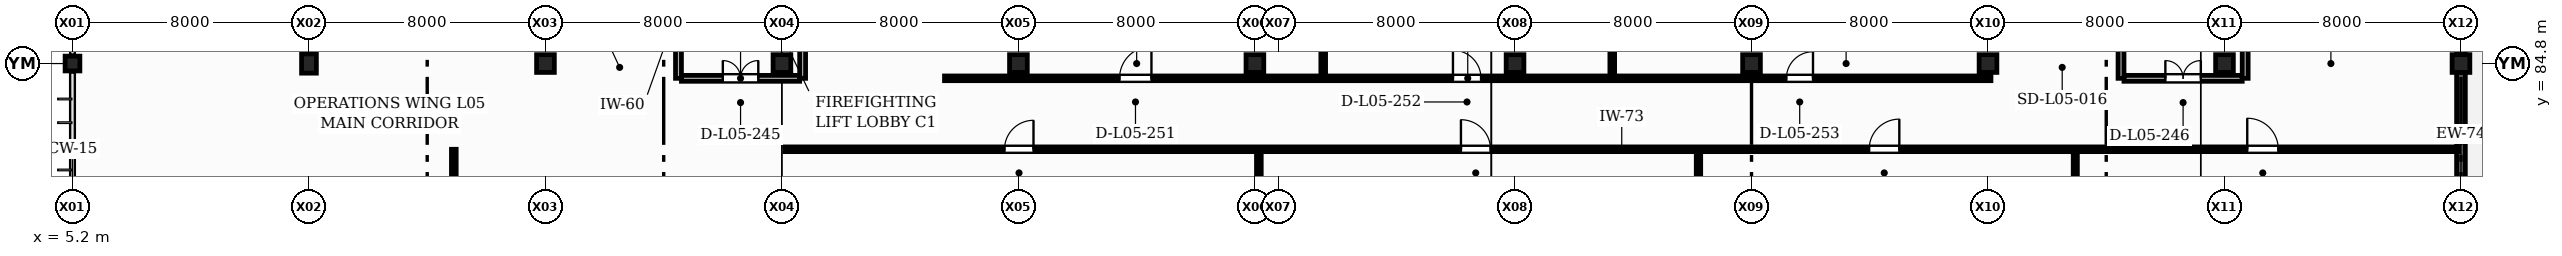
"""IFC4 building model, lengths in metres.
Left out: names, types, materials, properties, quantities, classifications, styles, units other than length and angle.
Written with IfcOpenShell. Run it as: python <this file> out.ifc"""

import sys

from ifc_helpers import new_model, si_unit, direction, frame, frame_2d, origin, origin_2d, place, context, subcontext, project, spatial, rectangle, extrude, element, fill, save


model = new_model("IFC4")
c1 = context("Model", 3, precision=1e-05, world=origin(), true_north=direction((0.0, 1.0)))
c2 = subcontext(c1, "Body", "Model", "MODEL_VIEW")
j1 = project(units=[si_unit("LENGTHUNIT", "METRE"), si_unit("PLANEANGLEUNIT", "RADIAN")], contexts=[c1])
p1 = place(None, origin())
s1 = spatial("IfcSite", under=j1, at=p1, CompositionType="ELEMENT")
p2 = place(p1, origin())
s2 = spatial("IfcBuilding", under=s1, at=p2, CompositionType="ELEMENT")
p3 = place(p2, frame((0.0, 0.0, 21.9)))
s3 = spatial("IfcBuildingStorey", under=s2, at=p3, CompositionType="ELEMENT", Elevation=21.9)
p4 = place(p3, frame((5.2, 84.8, 0.0), z_axis=(0.0, 0.0, 1.0), x_axis=(1.0, 0.0, 0.0)))
e1 = element("IfcColumn", 1, at=p4, inside=s3, PredefinedType="COLUMN", context=c2, shape_type="SweptSolid", body=[
    extrude(rectangle(XDim=0.5, YDim=0.5, at=origin_2d()), origin(), (0.0, 0.0, 1.0), 3.9),
])
p5 = place(p3, frame((13.2, 84.8, 0.0), z_axis=(0.0, 0.0, 1.0), x_axis=(1.0, 0.0, 0.0)))
e2 = element("IfcColumn", 2, at=p5, inside=s3, PredefinedType="COLUMN", context=c2, shape_type="SweptSolid", body=[
    extrude(rectangle(XDim=0.5, YDim=0.65, at=origin_2d()), origin(), (0.0, 0.0, 1.0), 3.9),
])
for number, where, z_axis, x_axis in (
    (3, (21.2, 84.8, 0.0), (0.0, 0.0, 1.0), (1.0, 0.0, 0.0)),
    (4, (29.2, 84.8, 0.0), (0.0, 0.0, 1.0), (1.0, 0.0, 0.0)),
    (5, (37.2, 84.8, 0.0), (0.0, 0.0, 1.0), (1.0, 0.0, 0.0)),
    (6, (45.2, 84.8, 0.0), (0.0, 0.0, 1.0), (1.0, 0.0, 0.0)),
    (7, (54.0, 84.8, 0.0), (0.0, 0.0, 1.0), (1.0, 0.0, 0.0)),
    (8, (62.0, 84.8, 0.0), (0.0, 0.0, 1.0), (1.0, 0.0, 0.0)),
    (9, (70.0, 84.8, 0.0), (0.0, 0.0, 1.0), (1.0, 0.0, 0.0)),
    (10, (78.0, 84.8, 0.0), (0.0, 0.0, 1.0), (1.0, 0.0, 0.0)),
    (11, (86.0, 84.8, 0.0), (0.0, 0.0, 1.0), (1.0, 0.0, 0.0)),
):
    element("IfcColumn", number, at=place(p3, frame(where, z_axis=z_axis, x_axis=x_axis)), inside=s3, PredefinedType="COLUMN", context=c2, shape_type="SweptSolid", body=[
        extrude(rectangle(XDim=0.6, YDim=0.6, at=origin_2d()), origin(), (0.0, 0.0, 1.0), 3.9),
    ])
p6 = place(p3, frame((86.0, 77.1, 0.0), z_axis=(0.0, 0.0, 1.0), x_axis=(0.0, 1.0, 0.0)))
e12 = element("IfcWall", 12, at=p6, inside=s3, PredefinedType="SOLIDWALL", context=c2, shape_type="SweptSolid", body=[
    extrude(rectangle(XDim=7.4, YDim=0.295, at=frame_2d((3.7, 0.0))), origin(), (0.0, 0.0, 1.0), 3.0),
])
p7 = place(p6, frame((2.525, 0.0, 0.0)))
e13 = element("IfcOpeningElement", 13, at=p7, cuts=e12, PredefinedType="OPENING", context=c2, shape_type="SweptSolid", body=[
    extrude(rectangle(XDim=1.15, YDim=2.15, at=frame_2d((0.575, 1.075))), frame((0.0, 0.157, 0.0), z_axis=(0.0, -1.0, 0.0), x_axis=(1.0, 0.0, 0.0)), (0.0, 0.0, 1.0), 0.315),
])
p8 = place(p3, frame((86.0, 85.1, 0.0), z_axis=(0.0, 0.0, 1.0), x_axis=(0.0, 1.0, 0.0)))
e14 = element("IfcWall", 14, at=p8, inside=s3, PredefinedType="SOLIDWALL", context=c2, shape_type="SweptSolid", body=[
    extrude(rectangle(XDim=7.4, YDim=0.295, at=frame_2d((3.7, 0.0))), origin(), (0.0, 0.0, 1.0), 3.0),
])
p9 = place(p8, frame((2.3, 0.0, 0.9)))
e15 = element("IfcOpeningElement", 15, at=p9, cuts=e14, PredefinedType="OPENING", context=c2, shape_type="SweptSolid", body=[
    extrude(rectangle(XDim=2.8, YDim=1.8, at=frame_2d((1.4, 0.9))), frame((0.0, 0.157, 0.0), z_axis=(0.0, -1.0, 0.0), x_axis=(1.0, 0.0, 0.0)), (0.0, 0.0, 1.0), 0.315),
])
p10 = place(p3, frame((25.8, 84.3, 0.0), z_axis=(0.0, 0.0, 1.0), x_axis=(1.0, 0.0, 0.0)))
e16 = element("IfcWall", 16, at=p10, inside=s3, PredefinedType="PARTITIONING", context=c2, shape_type="SweptSolid", body=[
    extrude(rectangle(XDim=4.0, YDim=0.2, at=frame_2d((2.0, 0.0))), origin(), (0.0, 0.0, 1.0), 2.785),
])
p11 = place(p10, frame((1.4, 0.0, 0.0)))
e17 = element("IfcOpeningElement", 17, at=p11, cuts=e16, PredefinedType="OPENING", context=c2, shape_type="SweptSolid", body=[
    extrude(rectangle(XDim=1.2, YDim=2.15, at=frame_2d((0.6, 1.075))), frame((0.0, 0.11, 0.0), z_axis=(0.0, -1.0, 0.0), x_axis=(1.0, 0.0, 0.0)), (0.0, 0.0, 1.0), 0.22),
])
p12 = place(p3, frame((25.7, 84.3, 0.0), z_axis=(0.0, 0.0, 1.0), x_axis=(0.0, 1.0, 0.0)))
e18 = element("IfcWall", 18, at=p12, inside=s3, PredefinedType="PARTITIONING", context=c2, shape_type="SweptSolid", body=[
    extrude(rectangle(XDim=4.8, YDim=0.2, at=frame_2d((2.4, 0.0))), origin(), (0.0, 0.0, 1.0), 2.985),
])
p13 = place(p3, frame((29.9, 84.3, 0.0), z_axis=(0.0, 0.0, 1.0), x_axis=(0.0, 1.0, 0.0)))
e19 = element("IfcWall", 19, at=p13, inside=s3, PredefinedType="PARTITIONING", context=c2, shape_type="SweptSolid", body=[
    extrude(rectangle(XDim=4.8, YDim=0.2, at=frame_2d((2.4, 0.0))), origin(), (0.0, 0.0, 1.0), 3.035),
])
p14 = place(p3, frame((74.6, 84.3, 0.0), z_axis=(0.0, 0.0, 1.0), x_axis=(1.0, 0.0, 0.0)))
e20 = element("IfcWall", 20, at=p14, inside=s3, PredefinedType="PARTITIONING", context=c2, shape_type="SweptSolid", body=[
    extrude(rectangle(XDim=4.0, YDim=0.2, at=frame_2d((2.0, 0.0))), origin(), (0.0, 0.0, 1.0), 2.785),
])
p15 = place(p14, frame((1.4, 0.0, 0.0)))
e21 = element("IfcOpeningElement", 21, at=p15, cuts=e20, PredefinedType="OPENING", context=c2, shape_type="SweptSolid", body=[
    extrude(rectangle(XDim=1.2, YDim=2.15, at=frame_2d((0.6, 1.075))), frame((0.0, 0.11, 0.0), z_axis=(0.0, -1.0, 0.0), x_axis=(1.0, 0.0, 0.0)), (0.0, 0.0, 1.0), 0.22),
])
p16 = place(p3, frame((74.5, 84.3, 0.0), z_axis=(0.0, 0.0, 1.0), x_axis=(0.0, 1.0, 0.0)))
e22 = element("IfcWall", 22, at=p16, inside=s3, PredefinedType="PARTITIONING", context=c2, shape_type="SweptSolid", body=[
    extrude(rectangle(XDim=4.8, YDim=0.2, at=frame_2d((2.4, 0.0))), origin(), (0.0, 0.0, 1.0), 2.985),
])
p17 = place(p3, frame((78.7, 84.3, 0.0), z_axis=(0.0, 0.0, 1.0), x_axis=(0.0, 1.0, 0.0)))
e23 = element("IfcWall", 23, at=p17, inside=s3, PredefinedType="PARTITIONING", context=c2, shape_type="SweptSolid", body=[
    extrude(rectangle(XDim=4.8, YDim=0.2, at=frame_2d((2.4, 0.0))), origin(), (0.0, 0.0, 1.0), 3.035),
])
p18 = place(p3, frame((45.334, 76.88, 0.0), z_axis=(0.0, 0.0, 1.0), x_axis=(0.0, 1.0, 0.0)))
e24 = element("IfcWall", 24, at=p18, inside=s3, PredefinedType="PARTITIONING", context=c2, shape_type="SweptSolid", body=[
    extrude(rectangle(XDim=4.92, YDim=0.16, at=frame_2d((2.46, 0.0))), origin(), (0.0, 0.0, 1.0), 2.785),
])
p19 = place(p3, frame((60.206, 76.88, 0.0), z_axis=(0.0, 0.0, 1.0), x_axis=(0.0, 1.0, 0.0)))
e25 = element("IfcWall", 25, at=p19, inside=s3, PredefinedType="PARTITIONING", context=c2, shape_type="SweptSolid", body=[
    extrude(rectangle(XDim=4.92, YDim=0.15, at=frame_2d((2.46, 0.0))), origin(), (0.0, 0.0, 1.0), 2.985),
])
p20 = place(p3, frame((72.953, 76.88, 0.0), z_axis=(0.0, 0.0, 1.0), x_axis=(0.0, 1.0, 0.0)))
e26 = element("IfcWall", 26, at=p20, inside=s3, PredefinedType="PARTITIONING", context=c2, shape_type="SweptSolid", body=[
    extrude(rectangle(XDim=4.92, YDim=0.14, at=frame_2d((2.46, 0.0))), origin(), (0.0, 0.0, 1.0), 2.985),
])
p21 = place(p3, frame((29.3, 81.9, 0.0), z_axis=(0.0, 0.0, 1.0), x_axis=(1.0, 0.0, 0.0)))
e27 = element("IfcWall", 27, at=p21, inside=s3, PredefinedType="PARTITIONING", context=c2, shape_type="SweptSolid", body=[
    extrude(rectangle(XDim=56.62, YDim=0.16, at=frame_2d((28.31, 0.0))), origin(), (0.0, 0.0, 1.0), 2.785),
])
p22 = place(p21, frame((7.43, 0.0, 0.0)))
e28 = element("IfcOpeningElement", 28, at=p22, cuts=e27, PredefinedType="OPENING", context=c2, shape_type="SweptSolid", body=[
    extrude(rectangle(XDim=0.98, YDim=2.12, at=frame_2d((0.49, 1.06))), frame((0.0, 0.09, 0.0), z_axis=(0.0, -1.0, 0.0), x_axis=(1.0, 0.0, 0.0)), (0.0, 0.0, 1.0), 0.18),
])
p23 = place(p21, frame((22.87, 0.0, 0.0)))
e29 = element("IfcOpeningElement", 29, at=p23, cuts=e27, PredefinedType="OPENING", context=c2, shape_type="SweptSolid", body=[
    extrude(rectangle(XDim=1.0, YDim=2.1, at=frame_2d((0.5, 1.05))), frame((0.0, 0.09, 0.0), z_axis=(0.0, -1.0, 0.0), x_axis=(1.0, 0.0, 0.0)), (0.0, 0.0, 1.0), 0.18),
])
p24 = place(p21, frame((36.68, 0.0, 0.0)))
e30 = element("IfcOpeningElement", 30, at=p24, cuts=e27, PredefinedType="OPENING", context=c2, shape_type="SweptSolid", body=[
    extrude(rectangle(XDim=1.02, YDim=2.12, at=frame_2d((0.51, 1.06))), frame((0.0, 0.09, 0.0), z_axis=(0.0, -1.0, 0.0), x_axis=(1.0, 0.0, 0.0)), (0.0, 0.0, 1.0), 0.18),
])
p25 = place(p21, frame((49.47, 0.0, 0.0)))
e31 = element("IfcOpeningElement", 31, at=p25, cuts=e27, PredefinedType="OPENING", context=c2, shape_type="SweptSolid", body=[
    extrude(rectangle(XDim=1.05, YDim=2.1, at=frame_2d((0.525, 1.05))), frame((0.0, 0.09, 0.0), z_axis=(0.0, -1.0, 0.0), x_axis=(1.0, 0.0, 0.0)), (0.0, 0.0, 1.0), 0.18),
])
p26 = place(p3, frame((47.511, 84.5, 0.0), z_axis=(0.0, 0.0, 1.0), x_axis=(0.0, 1.0, 0.0)))
e32 = element("IfcWall", 32, at=p26, inside=s3, PredefinedType="PARTITIONING", context=c2, shape_type="SweptSolid", body=[
    extrude(rectangle(XDim=8.22, YDim=0.16, at=frame_2d((4.11, 0.0))), origin(), (0.0, 0.0, 1.0), 2.785),
])
p27 = place(p3, frame((57.289, 84.5, 0.0), z_axis=(0.0, 0.0, 1.0), x_axis=(0.0, 1.0, 0.0)))
e33 = element("IfcWall", 33, at=p27, inside=s3, PredefinedType="PARTITIONING", context=c2, shape_type="SweptSolid", body=[
    extrude(rectangle(XDim=8.22, YDim=0.16, at=frame_2d((4.11, 0.0))), origin(), (0.0, 0.0, 1.0), 2.885),
])
p28 = place(p3, frame((34.7, 84.3, 0.0), z_axis=(0.0, 0.0, 1.0), x_axis=(1.0, 0.0, 0.0)))
e34 = element("IfcWall", 34, at=p28, inside=s3, PredefinedType="PARTITIONING", context=c2, shape_type="SweptSolid", body=[
    extrude(rectangle(XDim=35.4, YDim=0.16, at=frame_2d((17.7, 0.0))), origin(), (0.0, 0.0, 1.0), 2.785),
])
p29 = place(p28, frame((5.92, 0.0, 0.0)))
e35 = element("IfcOpeningElement", 35, at=p29, cuts=e34, PredefinedType="OPENING", context=c2, shape_type="SweptSolid", body=[
    extrude(rectangle(XDim=1.08, YDim=2.14, at=frame_2d((0.54, 1.07))), frame((0.0, 0.09, 0.0), z_axis=(0.0, -1.0, 0.0), x_axis=(1.0, 0.0, 0.0)), (0.0, 0.0, 1.0), 0.18),
])
p30 = place(p28, frame((17.2, 0.0, 0.0)))
e36 = element("IfcOpeningElement", 36, at=p30, cuts=e34, PredefinedType="OPENING", context=c2, shape_type="SweptSolid", body=[
    extrude(rectangle(XDim=0.95, YDim=2.15, at=frame_2d((0.475, 1.075))), frame((0.0, 0.09, 0.0), z_axis=(0.0, -1.0, 0.0), x_axis=(1.0, 0.0, 0.0)), (0.0, 0.0, 1.0), 0.18),
])
p31 = place(p28, frame((28.48, 0.0, 0.0)))
e37 = element("IfcOpeningElement", 37, at=p31, cuts=e34, PredefinedType="OPENING", context=c2, shape_type="SweptSolid", body=[
    extrude(rectangle(XDim=0.9, YDim=2.1, at=frame_2d((0.45, 1.05))), frame((0.0, 0.09, 0.0), z_axis=(0.0, -1.0, 0.0), x_axis=(1.0, 0.0, 0.0)), (0.0, 0.0, 1.0), 0.18),
])
p32 = place(p3, frame((18.1, 60.88, 0.0), z_axis=(0.0, 0.0, 1.0), x_axis=(0.0, 1.0, 0.0)))
e38 = element("IfcWall", 38, at=p32, inside=s3, PredefinedType="PARTITIONING", context=c2, shape_type="SweptSolid", body=[
    extrude(rectangle(XDim=21.02, YDim=0.16, at=frame_2d((10.51, 0.0))), origin(), (0.0, 0.0, 1.0), 2.935),
])
p33 = place(p32, frame((9.85, 0.0, 0.0)))
e39 = element("IfcOpeningElement", 39, at=p33, cuts=e38, PredefinedType="OPENING", context=c2, shape_type="SweptSolid", body=[
    extrude(rectangle(XDim=0.92, YDim=2.1, at=frame_2d((0.46, 1.05))), frame((0.0, 0.09, 0.0), z_axis=(0.0, -1.0, 0.0), x_axis=(1.0, 0.0, 0.0)), (0.0, 0.0, 1.0), 0.18),
])
p34 = place(p11, origin())
e40 = element("IfcDoor", 40, at=p34, inside=s3, OperationType="DOUBLE_DOOR_SINGLE_SWING", PredefinedType="DOOR", context=c2, shape_type="SweptSolid", body=[
    extrude(rectangle(XDim=1.2, YDim=2.15, at=frame_2d((0.6, 1.075))), frame((0.0, 0.025, 0.0), z_axis=(0.0, -1.0, 0.0), x_axis=(1.0, 0.0, 0.0)), (0.0, 0.0, 1.0), 0.05),
])
fill(e17, e40)
p35 = place(p15, origin())
e41 = element("IfcDoor", 41, at=p35, inside=s3, OperationType="DOUBLE_DOOR_SINGLE_SWING", PredefinedType="DOOR", context=c2, shape_type="SweptSolid", body=[
    extrude(rectangle(XDim=1.2, YDim=2.15, at=frame_2d((0.6, 1.075))), frame((0.0, 0.025, 0.0), z_axis=(0.0, -1.0, 0.0), x_axis=(1.0, 0.0, 0.0)), (0.0, 0.0, 1.0), 0.05),
])
fill(e21, e41)
p36 = place(p22, origin())
e42 = element("IfcDoor", 42, at=p36, inside=s3, OperationType="SINGLE_SWING_RIGHT", PredefinedType="DOOR", context=c2, shape_type="SweptSolid", body=[
    extrude(rectangle(XDim=0.98, YDim=2.12, at=frame_2d((0.49, 1.06))), frame((0.0, 0.025, 0.0), z_axis=(0.0, -1.0, 0.0), x_axis=(1.0, 0.0, 0.0)), (0.0, 0.0, 1.0), 0.05),
])
fill(e28, e42)
p37 = place(p23, origin())
e43 = element("IfcDoor", 43, at=p37, inside=s3, OperationType="SINGLE_SWING_LEFT", PredefinedType="DOOR", context=c2, shape_type="SweptSolid", body=[
    extrude(rectangle(XDim=1.0, YDim=2.1, at=frame_2d((0.5, 1.05))), frame((0.0, 0.025, 0.0), z_axis=(0.0, -1.0, 0.0), x_axis=(1.0, 0.0, 0.0)), (0.0, 0.0, 1.0), 0.05),
])
fill(e29, e43)
p38 = place(p24, origin())
e44 = element("IfcDoor", 44, at=p38, inside=s3, OperationType="SINGLE_SWING_RIGHT", PredefinedType="DOOR", context=c2, shape_type="SweptSolid", body=[
    extrude(rectangle(XDim=1.02, YDim=2.12, at=frame_2d((0.51, 1.06))), frame((0.0, 0.025, 0.0), z_axis=(0.0, -1.0, 0.0), x_axis=(1.0, 0.0, 0.0)), (0.0, 0.0, 1.0), 0.05),
])
fill(e30, e44)
p39 = place(p25, origin())
e45 = element("IfcDoor", 45, at=p39, inside=s3, OperationType="SINGLE_SWING_LEFT", PredefinedType="DOOR", context=c2, shape_type="SweptSolid", body=[
    extrude(rectangle(XDim=1.05, YDim=2.1, at=frame_2d((0.525, 1.05))), frame((0.0, 0.025, 0.0), z_axis=(0.0, -1.0, 0.0), x_axis=(1.0, 0.0, 0.0)), (0.0, 0.0, 1.0), 0.05),
])
fill(e31, e45)
p40 = place(p29, origin())
e46 = element("IfcDoor", 46, at=p40, inside=s3, OperationType="SINGLE_SWING_RIGHT", PredefinedType="DOOR", context=c2, shape_type="SweptSolid", body=[
    extrude(rectangle(XDim=1.08, YDim=2.14, at=frame_2d((0.54, 1.07))), frame((0.0, 0.025, 0.0), z_axis=(0.0, -1.0, 0.0), x_axis=(1.0, 0.0, 0.0)), (0.0, 0.0, 1.0), 0.05),
])
fill(e35, e46)
p41 = place(p30, origin())
e47 = element("IfcDoor", 47, at=p41, inside=s3, OperationType="SINGLE_SWING_LEFT", PredefinedType="DOOR", context=c2, shape_type="SweptSolid", body=[
    extrude(rectangle(XDim=0.95, YDim=2.15, at=frame_2d((0.475, 1.075))), frame((0.0, 0.025, 0.0), z_axis=(0.0, -1.0, 0.0), x_axis=(1.0, 0.0, 0.0)), (0.0, 0.0, 1.0), 0.05),
])
fill(e36, e47)
p42 = place(p31, origin())
e48 = element("IfcDoor", 48, at=p42, inside=s3, OperationType="SINGLE_SWING_RIGHT", PredefinedType="DOOR", context=c2, shape_type="SweptSolid", body=[
    extrude(rectangle(XDim=0.9, YDim=2.1, at=frame_2d((0.45, 1.05))), frame((0.0, 0.025, 0.0), z_axis=(0.0, -1.0, 0.0), x_axis=(1.0, 0.0, 0.0)), (0.0, 0.0, 1.0), 0.05),
])
fill(e37, e48)
save(model, sys.argv[1])
